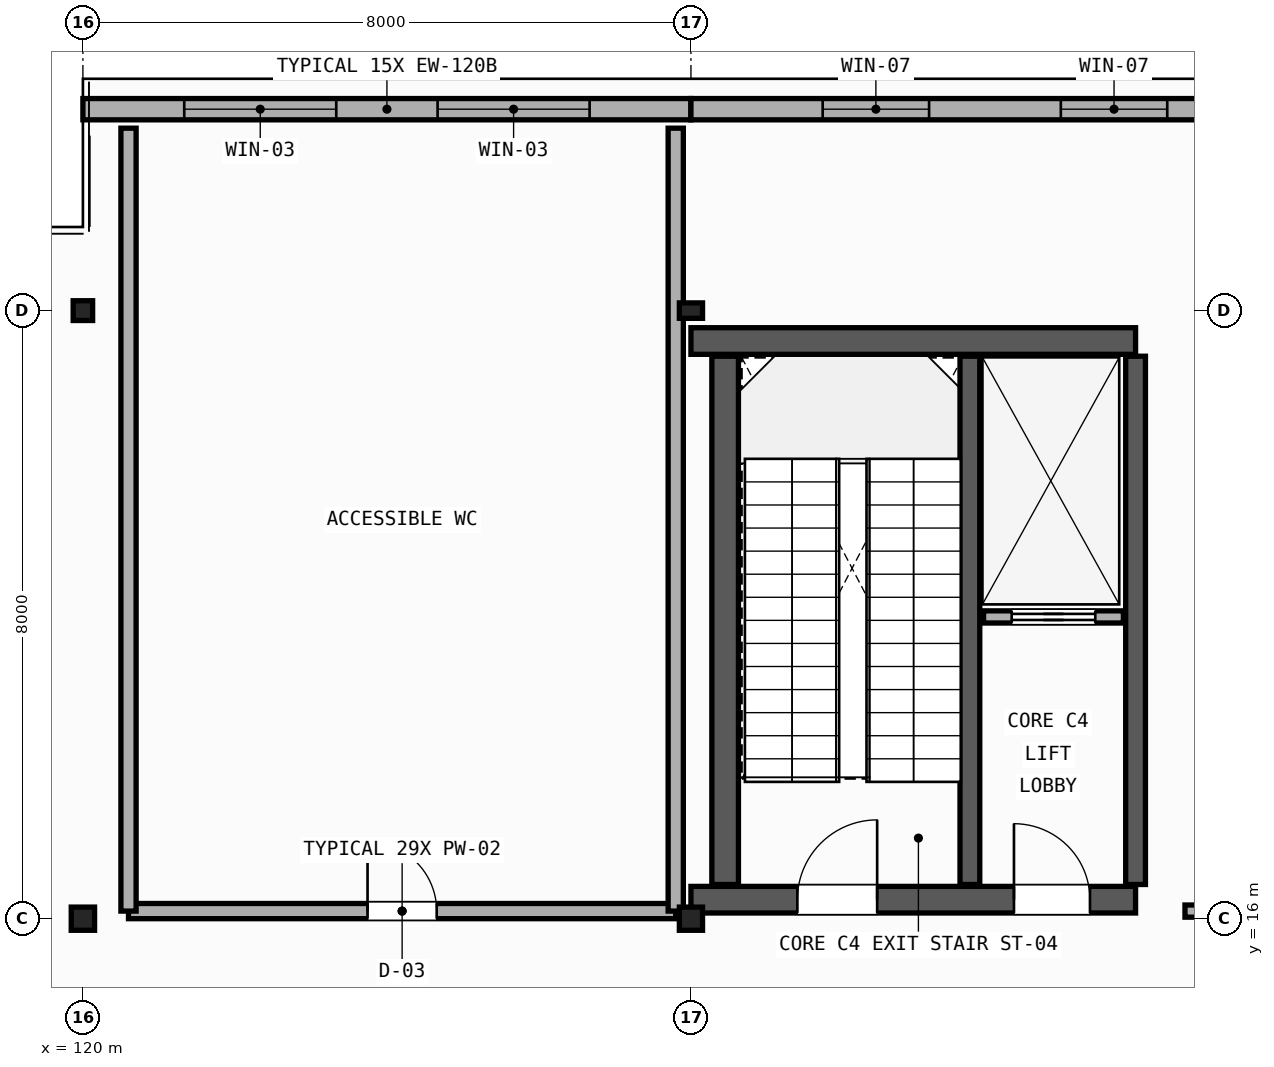
"""IFC4 building model, lengths in metres.
Left out: names, types, materials, properties, quantities, classifications, styles, units other than length and angle.
Written with IfcOpenShell. Run it as: python <this file> out.ifc"""

import sys

from ifc_helpers import new_model, si_unit, direction, frame, frame_2d, origin, origin_2d, place, context, subcontext, project, spatial, rectangle, hollow_rectangle, i_section, extrude, element, fill, save


model = new_model("IFC4")
c1 = context("Model", 3, precision=1e-05, world=origin(), true_north=direction((0.0, 1.0)))
c2 = subcontext(c1, "Body", "Model", "MODEL_VIEW")
j1 = project(units=[si_unit("LENGTHUNIT", "METRE"), si_unit("PLANEANGLEUNIT", "RADIAN")], contexts=[c1])
p1 = place(None, origin())
s1 = spatial("IfcSite", under=j1, at=p1, CompositionType="ELEMENT")
p2 = place(p1, origin())
s2 = spatial("IfcBuilding", under=s1, at=p2, CompositionType="ELEMENT")
p3 = place(p2, frame((0.0, 0.0, 10.2)))
s3 = spatial("IfcBuildingStorey", under=s2, at=p3, CompositionType="ELEMENT", Elevation=10.2)
p4 = place(p3, frame((120.0, 16.0, 0.0), z_axis=(0.0, 0.0, 1.0), x_axis=(0.0, 1.0, 0.0)))
e1 = element("IfcColumn", 1, at=p4, inside=s3, PredefinedType="COLUMN", context=c2, shape_type="SweptSolid", body=[
    extrude(i_section(OverallWidth=0.305, OverallDepth=0.307, WebThickness=0.01, FlangeThickness=0.015, FilletRadius=0.013, at=origin_2d()), origin(), (0.0, 0.0, 1.0), 4.58),
])
p5 = place(p3, frame((120.0, 24.0, 0.0), z_axis=(0.0, 0.0, 1.0), x_axis=(1.0, 0.0, 0.0)))
e2 = element("IfcColumn", 2, at=p5, inside=s3, PredefinedType="COLUMN", context=c2, shape_type="SweptSolid", body=[
    extrude(i_section(OverallWidth=0.256, OverallDepth=0.26, WebThickness=0.011, FlangeThickness=0.017, FilletRadius=0.011, at=origin_2d()), origin(), (0.0, 0.0, 1.0), 4.58),
])
p6 = place(p3, frame((128.0, 16.0, 0.0), z_axis=(0.0, 0.0, 1.0), x_axis=(1.0, 0.0, 0.0)))
e3 = element("IfcColumn", 3, at=p6, inside=s3, PredefinedType="COLUMN", context=c2, shape_type="SweptSolid", body=[
    extrude(hollow_rectangle(XDim=0.305, YDim=0.305, WallThickness=0.012, InnerFilletRadius=0.012, OuterFilletRadius=0.024, at=origin_2d()), origin(), (0.0, 0.0, 1.0), 4.58),
])
p7 = place(p3, frame((128.0, 24.0, 0.0), z_axis=(0.0, 0.0, 1.0), x_axis=(0.0, 1.0, 0.0)))
e4 = element("IfcColumn", 4, at=p7, inside=s3, PredefinedType="COLUMN", context=c2, shape_type="SweptSolid", body=[
    extrude(hollow_rectangle(XDim=0.203, YDim=0.305, WallThickness=0.009, InnerFilletRadius=0.009, OuterFilletRadius=0.018, at=origin_2d()), origin(), (0.0, 0.0, 1.0), 4.58),
])
p8 = place(p3, frame((120.0, 26.65, 0.0), z_axis=(0.0, 0.0, 1.0), x_axis=(1.0, 0.0, 0.0)))
e5 = element("IfcWall", 5, at=p8, inside=s3, PredefinedType="STANDARD", context=c2, shape_type="SweptSolid", body=[
    extrude(rectangle(XDim=8.0, YDim=0.28, at=frame_2d((4.0, 0.0))), origin(), (0.0, 0.0, 1.0), 4.4),
])
p9 = place(p8, frame((1.333, 0.0, 0.9)))
e6 = element("IfcOpeningElement", 6, at=p9, cuts=e5, PredefinedType="OPENING", context=c2, shape_type="SweptSolid", body=[
    extrude(rectangle(XDim=2.0, YDim=2.6, at=frame_2d((1.0, 1.3))), frame((0.0, 0.15, 0.0), z_axis=(0.0, -1.0, 0.0), x_axis=(1.0, 0.0, 0.0)), (0.0, 0.0, 1.0), 0.3),
])
p10 = place(p8, frame((4.667, 0.0, 0.9)))
e7 = element("IfcOpeningElement", 7, at=p10, cuts=e5, PredefinedType="OPENING", context=c2, shape_type="SweptSolid", body=[
    extrude(rectangle(XDim=2.0, YDim=2.6, at=frame_2d((1.0, 1.3))), frame((0.0, 0.15, 0.0), z_axis=(0.0, -1.0, 0.0), x_axis=(1.0, 0.0, 0.0)), (0.0, 0.0, 1.0), 0.3),
])
p11 = place(p3, frame((128.0, 26.65, 0.0), z_axis=(0.0, 0.0, 1.0), x_axis=(1.0, 0.0, 0.0)))
e8 = element("IfcWall", 8, at=p11, inside=s3, PredefinedType="STANDARD", context=c2, shape_type="SweptSolid", body=[
    extrude(rectangle(XDim=8.0, YDim=0.28, at=frame_2d((4.0, 0.0))), origin(), (0.0, 0.0, 1.0), 4.4),
])
p12 = place(p11, frame((1.733, 0.0, 0.95)))
e9 = element("IfcOpeningElement", 9, at=p12, cuts=e8, PredefinedType="OPENING", context=c2, shape_type="SweptSolid", body=[
    extrude(rectangle(XDim=1.4, YDim=2.1, at=frame_2d((0.7, 1.05))), frame((0.0, 0.15, 0.0), z_axis=(0.0, -1.0, 0.0), x_axis=(1.0, 0.0, 0.0)), (0.0, 0.0, 1.0), 0.3),
])
p13 = place(p11, frame((4.867, 0.0, 0.95)))
e10 = element("IfcOpeningElement", 10, at=p13, cuts=e8, PredefinedType="OPENING", context=c2, shape_type="SweptSolid", body=[
    extrude(rectangle(XDim=1.4, YDim=2.1, at=frame_2d((0.7, 1.05))), frame((0.0, 0.15, 0.0), z_axis=(0.0, -1.0, 0.0), x_axis=(1.0, 0.0, 0.0)), (0.0, 0.0, 1.0), 0.3),
])
p14 = place(p3, frame((128.0, 16.25, 0.0), z_axis=(0.0, 0.0, 1.0), x_axis=(1.0, 0.0, 0.0)))
e11 = element("IfcWall", 11, at=p14, inside=s3, PredefinedType="SHEAR", context=c2, shape_type="SweptSolid", body=[
    extrude(rectangle(XDim=5.85, YDim=0.35, at=frame_2d((2.925, 0.0))), origin(), (0.0, 0.0, 1.0), 4.57),
])
p15 = place(p14, frame((1.4, 0.0, 0.0)))
e12 = element("IfcOpeningElement", 12, at=p15, cuts=e11, PredefinedType="OPENING", context=c2, shape_type="SweptSolid", body=[
    extrude(rectangle(XDim=1.05, YDim=2.1, at=frame_2d((0.525, 1.05))), frame((0.0, 0.185, 0.0), z_axis=(0.0, -1.0, 0.0), x_axis=(1.0, 0.0, 0.0)), (0.0, 0.0, 1.0), 0.37),
])
p16 = place(p14, frame((4.25, 0.0, 0.0)))
e13 = element("IfcOpeningElement", 13, at=p16, cuts=e11, PredefinedType="OPENING", context=c2, shape_type="SweptSolid", body=[
    extrude(rectangle(XDim=1.0, YDim=2.15, at=frame_2d((0.5, 1.075))), frame((0.0, 0.185, 0.0), z_axis=(0.0, -1.0, 0.0), x_axis=(1.0, 0.0, 0.0)), (0.0, 0.0, 1.0), 0.37),
])
p17 = place(p3, frame((128.0, 23.6, 0.0), z_axis=(0.0, 0.0, 1.0), x_axis=(1.0, 0.0, 0.0)))
e14 = element("IfcWall", 14, at=p17, inside=s3, PredefinedType="SHEAR", context=c2, shape_type="SweptSolid", body=[
    extrude(rectangle(XDim=5.85, YDim=0.35, at=frame_2d((2.925, 0.0))), origin(), (0.0, 0.0, 1.0), 4.57),
])
p18 = place(p3, frame((128.45, 16.45, 0.0), z_axis=(0.0, 0.0, 1.0), x_axis=(0.0, 1.0, 0.0)))
e15 = element("IfcWall", 15, at=p18, inside=s3, PredefinedType="SHEAR", context=c2, shape_type="SweptSolid", body=[
    extrude(rectangle(XDim=6.95, YDim=0.35, at=frame_2d((3.475, 0.0))), origin(), (0.0, 0.0, 1.0), 4.57),
])
for number, where, z_axis, x_axis in (
    (16, (133.85, 16.45, 0.0), (0.0, 0.0, 1.0), (0.0, 1.0, 0.0)),
    (17, (131.67, 16.45, 0.0), (0.0, 0.0, 1.0), (0.0, 1.0, 0.0)),
):
    element("IfcWall", number, at=place(p3, frame(where, z_axis=z_axis, x_axis=x_axis)), inside=s3, PredefinedType="SHEAR", context=c2, shape_type="SweptSolid", body=[
        extrude(rectangle(XDim=6.95, YDim=0.26, at=frame_2d((3.475, 0.0))), origin(), (0.0, 0.0, 1.0), 4.57),
    ])
p19 = place(p3, frame((131.85, 19.97, 0.0), z_axis=(0.0, 0.0, 1.0), x_axis=(1.0, 0.0, 0.0)))
e18 = element("IfcWall", 18, at=p19, inside=s3, PredefinedType="PARTITIONING", context=c2, shape_type="SweptSolid", body=[
    extrude(rectangle(XDim=1.84, YDim=0.16, at=frame_2d((0.92, 0.0))), origin(), (0.0, 0.0, 1.0), 3.6),
])
p20 = place(p19, frame((0.37, 0.0, 0.0)))
e19 = element("IfcOpeningElement", 19, at=p20, cuts=e18, PredefinedType="OPENING", context=c2, shape_type="SweptSolid", body=[
    extrude(rectangle(XDim=1.1, YDim=2.15, at=frame_2d((0.55, 1.075))), frame((0.0, 0.09, 0.0), z_axis=(0.0, -1.0, 0.0), x_axis=(1.0, 0.0, 0.0)), (0.0, 0.0, 1.0), 0.18),
])
p21 = place(p3, frame((120.6, 16.1, 0.0), z_axis=(0.0, 0.0, 1.0), x_axis=(1.0, 0.0, 0.0)))
e20 = element("IfcWall", 20, at=p21, inside=s3, PredefinedType="PLUMBINGWALL", context=c2, shape_type="SweptSolid", body=[
    extrude(rectangle(XDim=7.2, YDim=0.2, at=frame_2d((3.6, 0.0))), origin(), (0.0, 0.0, 1.0), 3.938),
])
p22 = place(p21, frame((3.145, 0.0, 0.0)))
e21 = element("IfcOpeningElement", 21, at=p22, cuts=e20, PredefinedType="OPENING", context=c2, shape_type="SweptSolid", body=[
    extrude(rectangle(XDim=0.91, YDim=2.1, at=frame_2d((0.455, 1.05))), frame((0.0, 0.11, 0.0), z_axis=(0.0, -1.0, 0.0), x_axis=(1.0, 0.0, 0.0)), (0.0, 0.0, 1.0), 0.22),
])
p23 = place(p3, frame((120.6, 16.1, 0.0), z_axis=(0.0, 0.0, 1.0), x_axis=(0.0, 1.0, 0.0)))
e22 = element("IfcWall", 22, at=p23, inside=s3, PredefinedType="PLUMBINGWALL", context=c2, shape_type="SweptSolid", body=[
    extrude(rectangle(XDim=10.3, YDim=0.2, at=frame_2d((5.15, 0.0))), origin(), (0.0, 0.0, 1.0), 4.007),
])
p24 = place(p3, frame((127.8, 16.1, 0.0), z_axis=(0.0, 0.0, 1.0), x_axis=(0.0, 1.0, 0.0)))
e23 = element("IfcWall", 23, at=p24, inside=s3, PredefinedType="PLUMBINGWALL", context=c2, shape_type="SweptSolid", body=[
    extrude(rectangle(XDim=10.3, YDim=0.2, at=frame_2d((5.15, 0.0))), origin(), (0.0, 0.0, 1.0), 3.778),
])
p25 = place(p3, frame((134.5, 16.1, 0.0), z_axis=(0.0, 0.0, 1.0), x_axis=(1.0, 0.0, 0.0)))
e24 = element("IfcWall", 24, at=p25, inside=s3, PredefinedType="PARTITIONING", context=c2, shape_type="SweptSolid", body=[
    extrude(rectangle(XDim=24.5, YDim=0.16, at=frame_2d((12.25, 0.0))), origin(), (0.0, 0.0, 1.0), 3.778),
])
p26 = place(p25, frame((11.56, 0.0, 0.0)))
e25 = element("IfcOpeningElement", 25, at=p26, cuts=e24, PredefinedType="OPENING", context=c2, shape_type="SweptSolid", body=[
    extrude(rectangle(XDim=1.38, YDim=2.25, at=frame_2d((0.69, 1.125))), frame((0.0, 0.09, 0.0), z_axis=(0.0, -1.0, 0.0), x_axis=(1.0, 0.0, 0.0)), (0.0, 0.0, 1.0), 0.18),
])
p27 = place(p9, origin())
e26 = element("IfcWindow", 26, at=p27, inside=s3, PartitioningType="SINGLE_PANEL", PredefinedType="WINDOW", context=c2, shape_type="SweptSolid", body=[
    extrude(rectangle(XDim=2.0, YDim=2.6, at=frame_2d((1.0, 1.3))), frame((0.0, 0.03, 0.0), z_axis=(0.0, -1.0, 0.0), x_axis=(1.0, 0.0, 0.0)), (0.0, 0.0, 1.0), 0.06),
])
fill(e6, e26)
p28 = place(p10, origin())
e27 = element("IfcWindow", 27, at=p28, inside=s3, PartitioningType="SINGLE_PANEL", PredefinedType="WINDOW", context=c2, shape_type="SweptSolid", body=[
    extrude(rectangle(XDim=2.0, YDim=2.6, at=frame_2d((1.0, 1.3))), frame((0.0, 0.03, 0.0), z_axis=(0.0, -1.0, 0.0), x_axis=(1.0, 0.0, 0.0)), (0.0, 0.0, 1.0), 0.06),
])
fill(e7, e27)
p29 = place(p12, origin())
e28 = element("IfcWindow", 28, at=p29, inside=s3, PartitioningType="SINGLE_PANEL", PredefinedType="WINDOW", context=c2, shape_type="SweptSolid", body=[
    extrude(rectangle(XDim=1.4, YDim=2.1, at=frame_2d((0.7, 1.05))), frame((0.0, 0.03, 0.0), z_axis=(0.0, -1.0, 0.0), x_axis=(1.0, 0.0, 0.0)), (0.0, 0.0, 1.0), 0.06),
])
fill(e9, e28)
p30 = place(p13, origin())
e29 = element("IfcWindow", 29, at=p30, inside=s3, PartitioningType="SINGLE_PANEL", PredefinedType="WINDOW", context=c2, shape_type="SweptSolid", body=[
    extrude(rectangle(XDim=1.4, YDim=2.1, at=frame_2d((0.7, 1.05))), frame((0.0, 0.03, 0.0), z_axis=(0.0, -1.0, 0.0), x_axis=(1.0, 0.0, 0.0)), (0.0, 0.0, 1.0), 0.06),
])
fill(e10, e29)
p31 = place(p20, origin())
e30 = element("IfcDoor", 30, at=p31, inside=s3, OperationType="SLIDING_TO_LEFT", PredefinedType="DOOR", context=c2, shape_type="SweptSolid", body=[
    extrude(rectangle(XDim=1.1, YDim=2.15, at=frame_2d((0.55, 1.075))), frame((0.0, 0.025, 0.0), z_axis=(0.0, -1.0, 0.0), x_axis=(1.0, 0.0, 0.0)), (0.0, 0.0, 1.0), 0.05),
])
fill(e19, e30)
p32 = place(p15, origin())
e31 = element("IfcDoor", 31, at=p32, inside=s3, OperationType="SINGLE_SWING_RIGHT", PredefinedType="DOOR", context=c2, shape_type="SweptSolid", body=[
    extrude(rectangle(XDim=1.05, YDim=2.1, at=frame_2d((0.525, 1.05))), frame((0.0, 0.025, 0.0), z_axis=(0.0, -1.0, 0.0), x_axis=(1.0, 0.0, 0.0)), (0.0, 0.0, 1.0), 0.05),
])
fill(e12, e31)
p33 = place(p16, origin())
e32 = element("IfcDoor", 32, at=p33, inside=s3, OperationType="SINGLE_SWING_LEFT", PredefinedType="DOOR", context=c2, shape_type="SweptSolid", body=[
    extrude(rectangle(XDim=1.0, YDim=2.15, at=frame_2d((0.5, 1.075))), frame((0.0, 0.025, 0.0), z_axis=(0.0, -1.0, 0.0), x_axis=(1.0, 0.0, 0.0)), (0.0, 0.0, 1.0), 0.05),
])
fill(e13, e32)
p34 = place(p22, origin())
e33 = element("IfcDoor", 33, at=p34, inside=s3, OperationType="SINGLE_SWING_LEFT", PredefinedType="DOOR", context=c2, shape_type="SweptSolid", body=[
    extrude(rectangle(XDim=0.91, YDim=2.1, at=frame_2d((0.455, 1.05))), frame((0.0, 0.025, 0.0), z_axis=(0.0, -1.0, 0.0), x_axis=(1.0, 0.0, 0.0)), (0.0, 0.0, 1.0), 0.05),
])
fill(e21, e33)
save(model, sys.argv[1])
